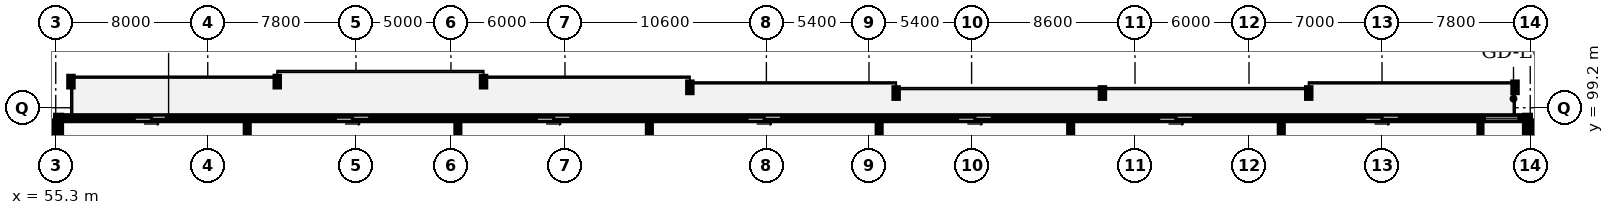
"""IFC4 building model, lengths in metres.
Left out: names, types, materials, properties, quantities, classifications, styles, units other than length and angle.
Written with IfcOpenShell. Run it as: python <this file> out.ifc"""

import sys

from ifc_helpers import new_model, si_unit, direction, frame, frame_2d, origin, place, context, subcontext, project, spatial, rectangle, extrude, element, fill, save


model = new_model("IFC4")
c1 = context("Model", 3, precision=1e-05, world=origin(), true_north=direction((0.0, 1.0)))
c2 = subcontext(c1, "Body", "Model", "MODEL_VIEW")
j1 = project(units=[si_unit("LENGTHUNIT", "METRE"), si_unit("PLANEANGLEUNIT", "RADIAN")], contexts=[c1])
p1 = place(None, origin())
s1 = spatial("IfcSite", under=j1, at=p1, CompositionType="ELEMENT")
p2 = place(p1, origin())
s2 = spatial("IfcBuilding", under=s1, at=p2, CompositionType="ELEMENT")
p3 = place(p2, frame((0.0, 0.0, 24.0)))
s3 = spatial("IfcBuildingStorey", under=s2, at=p3, CompositionType="ELEMENT", Elevation=24.0)
p4 = place(p3, frame((132.75, 95.2, 0.0), z_axis=(0.0, 0.0, 1.0), x_axis=(0.0, 1.0, 0.0)))
e1 = element("IfcWall", 1, at=p4, inside=s3, PredefinedType="STANDARD", context=c2, shape_type="SweptSolid", body=[
    extrude(rectangle(XDim=3.6, YDim=0.3, at=frame_2d((1.8, 0.0))), origin(), (0.0, 0.0, 1.0), 2.97),
])
p5 = place(p3, frame((132.9, 98.65, 0.0), z_axis=(0.0, 0.0, 1.0), x_axis=(-1.0, 0.0, 0.0)))
e2 = element("IfcWall", 2, at=p5, inside=s3, PredefinedType="STANDARD", context=c2, shape_type="SweptSolid", body=[
    extrude(rectangle(XDim=77.6, YDim=0.25, at=frame_2d((38.8, 0.0))), origin(), (0.0, 0.0, 1.0), 2.97),
])
p6 = place(p5, frame((71.661, 0.0, 0.0)))
e3 = element("IfcOpeningElement", 3, at=p6, cuts=e2, PredefinedType="OPENING", context=c2, shape_type="SweptSolid", body=[
    extrude(rectangle(XDim=1.8, YDim=2.2, at=frame_2d((0.9, 1.1))), frame((0.0, 0.135, 0.0), z_axis=(0.0, -1.0, 0.0), x_axis=(1.0, 0.0, 0.0)), (0.0, 0.0, 1.0), 0.27),
])
p7 = place(p5, frame((61.079, 0.0, 0.0)))
e4 = element("IfcOpeningElement", 4, at=p7, cuts=e2, PredefinedType="OPENING", context=c2, shape_type="SweptSolid", body=[
    extrude(rectangle(XDim=1.8, YDim=2.2, at=frame_2d((0.9, 1.1))), frame((0.0, 0.135, 0.0), z_axis=(0.0, -1.0, 0.0), x_axis=(1.0, 0.0, 0.0)), (0.0, 0.0, 1.0), 0.27),
])
p8 = place(p5, frame((50.498, 0.0, 0.0)))
e5 = element("IfcOpeningElement", 5, at=p8, cuts=e2, PredefinedType="OPENING", context=c2, shape_type="SweptSolid", body=[
    extrude(rectangle(XDim=1.8, YDim=2.2, at=frame_2d((0.9, 1.1))), frame((0.0, 0.135, 0.0), z_axis=(0.0, -1.0, 0.0), x_axis=(1.0, 0.0, 0.0)), (0.0, 0.0, 1.0), 0.27),
])
p9 = place(p5, frame((39.412, 0.0, 0.0)))
e6 = element("IfcOpeningElement", 6, at=p9, cuts=e2, PredefinedType="OPENING", context=c2, shape_type="SweptSolid", body=[
    extrude(rectangle(XDim=1.8, YDim=2.2, at=frame_2d((0.9, 1.1))), frame((0.0, 0.135, 0.0), z_axis=(0.0, -1.0, 0.0), x_axis=(1.0, 0.0, 0.0)), (0.0, 0.0, 1.0), 0.27),
])
p10 = place(p5, frame((28.326, 0.0, 0.0)))
e7 = element("IfcOpeningElement", 7, at=p10, cuts=e2, PredefinedType="OPENING", context=c2, shape_type="SweptSolid", body=[
    extrude(rectangle(XDim=1.8, YDim=2.2, at=frame_2d((0.9, 1.1))), frame((0.0, 0.135, 0.0), z_axis=(0.0, -1.0, 0.0), x_axis=(1.0, 0.0, 0.0)), (0.0, 0.0, 1.0), 0.27),
])
p11 = place(p5, frame((17.744, 0.0, 0.0)))
e8 = element("IfcOpeningElement", 8, at=p11, cuts=e2, PredefinedType="OPENING", context=c2, shape_type="SweptSolid", body=[
    extrude(rectangle(XDim=1.8, YDim=2.2, at=frame_2d((0.9, 1.1))), frame((0.0, 0.135, 0.0), z_axis=(0.0, -1.0, 0.0), x_axis=(1.0, 0.0, 0.0)), (0.0, 0.0, 1.0), 0.27),
])
p12 = place(p5, frame((6.901, 0.0, 0.0)))
e9 = element("IfcOpeningElement", 9, at=p12, cuts=e2, PredefinedType="OPENING", context=c2, shape_type="SweptSolid", body=[
    extrude(rectangle(XDim=1.8, YDim=2.2, at=frame_2d((0.9, 1.1))), frame((0.0, 0.135, 0.0), z_axis=(0.0, -1.0, 0.0), x_axis=(1.0, 0.0, 0.0)), (0.0, 0.0, 1.0), 0.27),
])
p13 = place(p5, frame((0.6, 0.0, 0.85)))
e10 = element("IfcOpeningElement", 10, at=p13, cuts=e2, PredefinedType="OPENING", context=c2, shape_type="SweptSolid", body=[
    extrude(rectangle(XDim=1.8, YDim=1.8, at=frame_2d((0.9, 0.9))), frame((0.0, 0.135, 0.0), z_axis=(0.0, -1.0, 0.0), x_axis=(1.0, 0.0, 0.0)), (0.0, 0.0, 1.0), 0.27),
])
p14 = place(p3, frame((55.45, 98.8, 0.0), z_axis=(0.0, 0.0, 1.0), x_axis=(0.0, -1.0, 0.0)))
e11 = element("IfcWall", 11, at=p14, inside=s3, PredefinedType="STANDARD", context=c2, shape_type="SweptSolid", body=[
    extrude(rectangle(XDim=3.6, YDim=0.3, at=frame_2d((1.8, 0.0))), origin(), (0.0, 0.0, 1.0), 2.97),
])
for number, where, z_axis, x_axis in (
    (12, (55.3, 69.43, 0.0), (0.0, 0.0, 1.0), (0.0, 1.0, 0.0)),
    (13, (132.9, 69.43, 0.0), (0.0, 0.0, 1.0), (0.0, 1.0, 0.0)),
    (14, (65.378, 69.43, 0.0), (0.0, 0.0, 1.0), (0.0, 1.0, 0.0)),
):
    element("IfcWall", number, at=place(p3, frame(where, z_axis=z_axis, x_axis=x_axis)), inside=s3, PredefinedType="PARTITIONING", context=c2, shape_type="SweptSolid", body=[
        extrude(rectangle(XDim=29.07, YDim=0.2, at=frame_2d((14.535, 0.0))), origin(), (0.0, 0.0, 1.0), 2.97),
    ])
p15 = place(p3, frame((76.464, 69.43, 0.0), z_axis=(0.0, 0.0, 1.0), x_axis=(0.0, 1.0, 0.0)))
e15 = element("IfcWall", 15, at=p15, inside=s3, PredefinedType="PARTITIONING", context=c2, shape_type="SweptSolid", body=[
    extrude(rectangle(XDim=29.07, YDim=0.2, at=frame_2d((14.535, 0.0))), origin(), (0.0, 0.0, 1.0), 2.22),
])
for number, where, z_axis, x_axis in (
    (16, (86.542, 69.43, 0.0), (0.0, 0.0, 1.0), (0.0, 1.0, 0.0)),
    (17, (98.635, 69.43, 0.0), (0.0, 0.0, 1.0), (0.0, 1.0, 0.0)),
    (18, (108.713, 69.43, 0.0), (0.0, 0.0, 1.0), (0.0, 1.0, 0.0)),
    (19, (119.799, 69.43, 0.0), (0.0, 0.0, 1.0), (0.0, 1.0, 0.0)),
):
    element("IfcWall", number, at=place(p3, frame(where, z_axis=z_axis, x_axis=x_axis)), inside=s3, PredefinedType="PARTITIONING", context=c2, shape_type="SweptSolid", body=[
        extrude(rectangle(XDim=29.07, YDim=0.2, at=frame_2d((14.535, 0.0))), origin(), (0.0, 0.0, 1.0), 2.97),
    ])
p16 = place(p3, frame((130.28, 88.19, 0.0), z_axis=(0.0, 0.0, 1.0), x_axis=(0.0, 1.0, 0.0)))
e20 = element("IfcWall", 20, at=p16, inside=s3, PredefinedType="PARTITIONING", context=c2, shape_type="SweptSolid", body=[
    extrude(rectangle(XDim=10.31, YDim=0.15, at=frame_2d((5.155, 0.0))), origin(), (0.0, 0.0, 1.0), 2.97),
])
p17 = place(p16, frame((0.513, 0.0, 0.0)))
e21 = element("IfcOpeningElement", 21, at=p17, cuts=e20, PredefinedType="OPENING", context=c2, shape_type="SweptSolid", body=[
    extrude(rectangle(XDim=0.84, YDim=2.04, at=frame_2d((0.42, 1.02))), frame((0.0, 0.085, 0.0), z_axis=(0.0, -1.0, 0.0), x_axis=(1.0, 0.0, 0.0)), (0.0, 0.0, 1.0), 0.17),
])
p18 = place(p16, frame((3.92, 0.0, 0.0)))
e22 = element("IfcOpeningElement", 22, at=p18, cuts=e20, PredefinedType="OPENING", context=c2, shape_type="SweptSolid", body=[
    extrude(rectangle(XDim=0.84, YDim=2.04, at=frame_2d((0.42, 1.02))), frame((0.0, 0.085, 0.0), z_axis=(0.0, -1.0, 0.0), x_axis=(1.0, 0.0, 0.0)), (0.0, 0.0, 1.0), 0.17),
])
p19 = place(p16, frame((5.48, 0.0, 0.0)))
e23 = element("IfcOpeningElement", 23, at=p19, cuts=e20, PredefinedType="OPENING", context=c2, shape_type="SweptSolid", body=[
    extrude(rectangle(XDim=0.88, YDim=2.06, at=frame_2d((0.44, 1.03))), frame((0.0, 0.085, 0.0), z_axis=(0.0, -1.0, 0.0), x_axis=(1.0, 0.0, 0.0)), (0.0, 0.0, 1.0), 0.17),
])
p20 = place(p6, origin())
e24 = element("IfcDoor", 24, at=p20, inside=s3, OperationType="SLIDING_TO_LEFT", PredefinedType="DOOR", context=c2, shape_type="SweptSolid", body=[
    extrude(rectangle(XDim=1.8, YDim=2.2, at=frame_2d((0.9, 1.1))), frame((0.0, 0.025, 0.0), z_axis=(0.0, -1.0, 0.0), x_axis=(1.0, 0.0, 0.0)), (0.0, 0.0, 1.0), 0.05),
])
fill(e3, e24)
p21 = place(p7, origin())
e25 = element("IfcDoor", 25, at=p21, inside=s3, OperationType="SLIDING_TO_LEFT", PredefinedType="DOOR", context=c2, shape_type="SweptSolid", body=[
    extrude(rectangle(XDim=1.8, YDim=2.2, at=frame_2d((0.9, 1.1))), frame((0.0, 0.025, 0.0), z_axis=(0.0, -1.0, 0.0), x_axis=(1.0, 0.0, 0.0)), (0.0, 0.0, 1.0), 0.05),
])
fill(e4, e25)
p22 = place(p8, origin())
e26 = element("IfcDoor", 26, at=p22, inside=s3, OperationType="SLIDING_TO_LEFT", PredefinedType="DOOR", context=c2, shape_type="SweptSolid", body=[
    extrude(rectangle(XDim=1.8, YDim=2.2, at=frame_2d((0.9, 1.1))), frame((0.0, 0.025, 0.0), z_axis=(0.0, -1.0, 0.0), x_axis=(1.0, 0.0, 0.0)), (0.0, 0.0, 1.0), 0.05),
])
fill(e5, e26)
p23 = place(p9, origin())
e27 = element("IfcDoor", 27, at=p23, inside=s3, OperationType="SLIDING_TO_LEFT", PredefinedType="DOOR", context=c2, shape_type="SweptSolid", body=[
    extrude(rectangle(XDim=1.8, YDim=2.2, at=frame_2d((0.9, 1.1))), frame((0.0, 0.025, 0.0), z_axis=(0.0, -1.0, 0.0), x_axis=(1.0, 0.0, 0.0)), (0.0, 0.0, 1.0), 0.05),
])
fill(e6, e27)
p24 = place(p10, origin())
e28 = element("IfcDoor", 28, at=p24, inside=s3, OperationType="SLIDING_TO_LEFT", PredefinedType="DOOR", context=c2, shape_type="SweptSolid", body=[
    extrude(rectangle(XDim=1.8, YDim=2.2, at=frame_2d((0.9, 1.1))), frame((0.0, 0.025, 0.0), z_axis=(0.0, -1.0, 0.0), x_axis=(1.0, 0.0, 0.0)), (0.0, 0.0, 1.0), 0.05),
])
fill(e7, e28)
p25 = place(p11, origin())
e29 = element("IfcDoor", 29, at=p25, inside=s3, OperationType="SLIDING_TO_LEFT", PredefinedType="DOOR", context=c2, shape_type="SweptSolid", body=[
    extrude(rectangle(XDim=1.8, YDim=2.2, at=frame_2d((0.9, 1.1))), frame((0.0, 0.025, 0.0), z_axis=(0.0, -1.0, 0.0), x_axis=(1.0, 0.0, 0.0)), (0.0, 0.0, 1.0), 0.05),
])
fill(e8, e29)
p26 = place(p12, origin())
e30 = element("IfcDoor", 30, at=p26, inside=s3, OperationType="SLIDING_TO_LEFT", PredefinedType="DOOR", context=c2, shape_type="SweptSolid", body=[
    extrude(rectangle(XDim=1.8, YDim=2.2, at=frame_2d((0.9, 1.1))), frame((0.0, 0.025, 0.0), z_axis=(0.0, -1.0, 0.0), x_axis=(1.0, 0.0, 0.0)), (0.0, 0.0, 1.0), 0.05),
])
fill(e9, e30)
p27 = place(p13, origin())
e31 = element("IfcWindow", 31, at=p27, inside=s3, PartitioningType="SINGLE_PANEL", PredefinedType="WINDOW", context=c2, shape_type="SweptSolid", body=[
    extrude(rectangle(XDim=1.8, YDim=1.8, at=frame_2d((0.9, 0.9))), frame((0.0, 0.03, 0.0), z_axis=(0.0, -1.0, 0.0), x_axis=(1.0, 0.0, 0.0)), (0.0, 0.0, 1.0), 0.06),
])
fill(e10, e31)
save(model, sys.argv[1])
